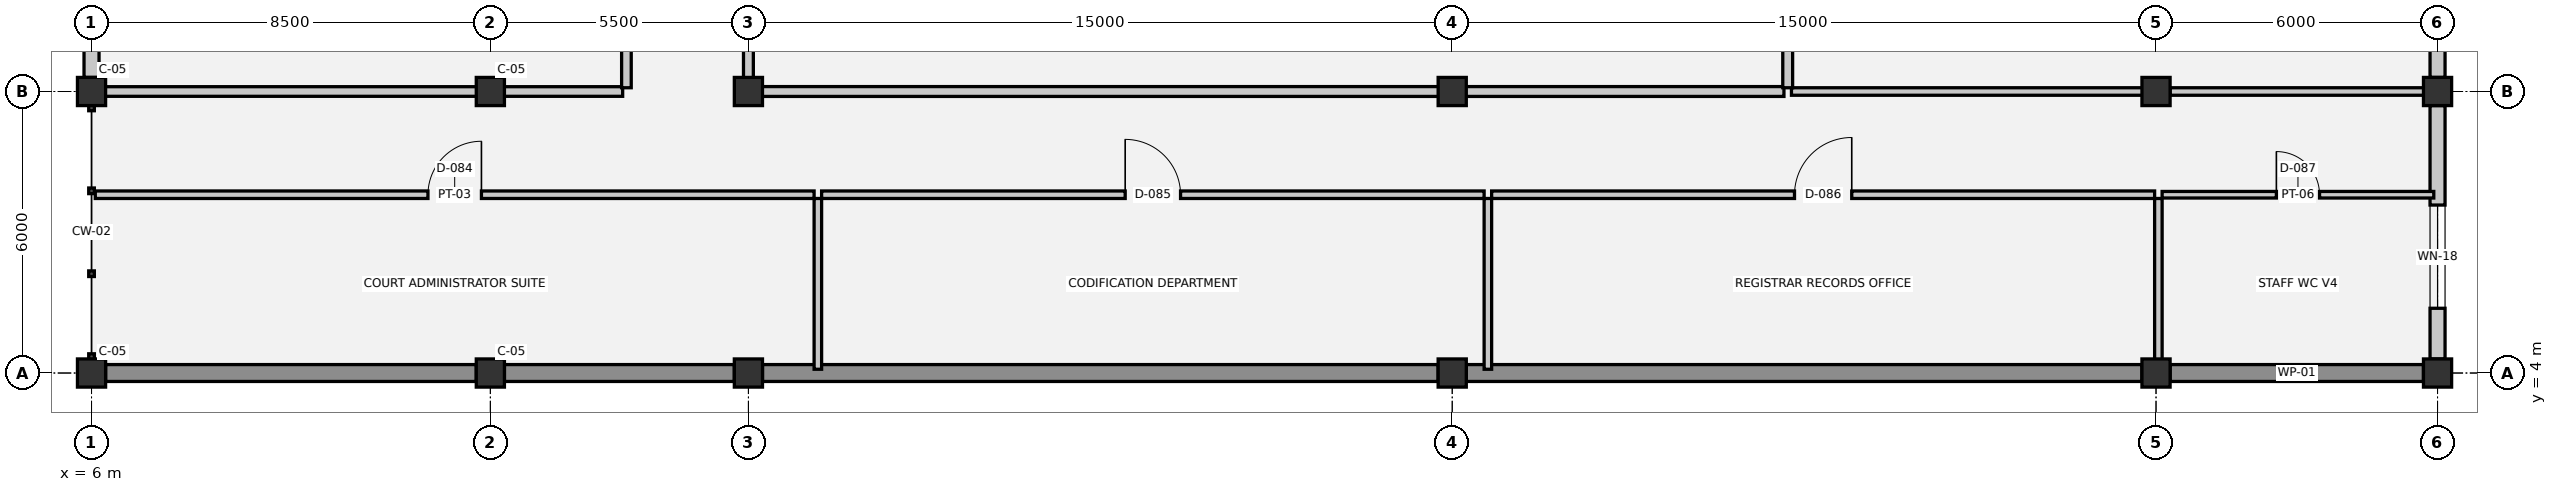
"""IFC4 building model, lengths in metres.
Left out: names, types, materials, properties, quantities, classifications, styles, units other than length and angle.
Written with IfcOpenShell. Run it as: python <this file> out.ifc"""

import sys

from ifc_helpers import new_model, si_unit, direction, frame, frame_2d, origin, origin_2d, place, context, subcontext, project, spatial, rectangle, extrude, element, fill, save


model = new_model("IFC4")
c1 = context("Model", 3, precision=1e-05, world=origin(), true_north=direction((0.0, 1.0)))
c2 = subcontext(c1, "Body", "Model", "MODEL_VIEW")
j1 = project(units=[si_unit("LENGTHUNIT", "METRE"), si_unit("PLANEANGLEUNIT", "RADIAN")], contexts=[c1])
p1 = place(None, origin())
s1 = spatial("IfcSite", under=j1, at=p1, CompositionType="ELEMENT")
p2 = place(p1, origin())
s2 = spatial("IfcBuilding", under=s1, at=p2, CompositionType="ELEMENT")
p3 = place(p2, frame((0.0, 0.0, 14.4)))
s3 = spatial("IfcBuildingStorey", under=s2, at=p3, CompositionType="ELEMENT", Elevation=14.4)
for number, where, z_axis, x_axis in (
    (1, (6.0, 4.0, 0.0), (0.0, 0.0, 1.0), (1.0, 0.0, 0.0)),
    (2, (6.0, 10.0, 0.0), (0.0, 0.0, 1.0), (1.0, 0.0, 0.0)),
    (3, (14.5, 4.0, 0.0), (0.0, 0.0, 1.0), (1.0, 0.0, 0.0)),
    (4, (14.5, 10.0, 0.0), (0.0, 0.0, 1.0), (1.0, 0.0, 0.0)),
    (5, (20.0, 4.0, 0.0), (0.0, 0.0, 1.0), (1.0, 0.0, 0.0)),
    (6, (20.0, 10.0, 0.0), (0.0, 0.0, 1.0), (1.0, 0.0, 0.0)),
    (7, (35.0, 4.0, 0.0), (0.0, 0.0, 1.0), (1.0, 0.0, 0.0)),
    (8, (35.0, 10.0, 0.0), (0.0, 0.0, 1.0), (1.0, 0.0, 0.0)),
    (9, (50.0, 4.0, 0.0), (0.0, 0.0, 1.0), (1.0, 0.0, 0.0)),
    (10, (50.0, 10.0, 0.0), (0.0, 0.0, 1.0), (1.0, 0.0, 0.0)),
    (11, (56.0, 4.0, 0.0), (0.0, 0.0, 1.0), (1.0, 0.0, 0.0)),
    (12, (56.0, 10.0, 0.0), (0.0, 0.0, 1.0), (1.0, 0.0, 0.0)),
):
    element("IfcColumn", number, at=place(p3, frame(where, z_axis=z_axis, x_axis=x_axis)), inside=s3, PredefinedType="COLUMN", context=c2, shape_type="SweptSolid", body=[
        extrude(rectangle(XDim=0.6, YDim=0.6, at=origin_2d()), origin(), (0.0, 0.0, 1.0), 3.9),
    ])
p4 = place(p3, frame((6.0, 10.3, 0.0), z_axis=(0.0, 0.0, 1.0), x_axis=(0.0, 1.0, 0.0)))
e13 = element("IfcWall", 13, at=p4, inside=s3, PredefinedType="SOLIDWALL", context=c2, shape_type="SweptSolid", body=[
    extrude(rectangle(XDim=6.4, YDim=0.32, at=frame_2d((3.2, 0.0))), origin(), (0.0, 0.0, 1.0), 2.61),
])
p5 = place(p4, frame((2.1, 0.0, 0.9)))
e14 = element("IfcOpeningElement", 14, at=p5, cuts=e13, PredefinedType="OPENING", context=c2, shape_type="SweptSolid", body=[
    extrude(rectangle(XDim=2.2, YDim=1.0, at=frame_2d((1.1, 0.5))), frame((0.0, 0.17, 0.0), z_axis=(0.0, -1.0, 0.0), x_axis=(1.0, 0.0, 0.0)), (0.0, 0.0, 1.0), 0.34),
])
p6 = place(p3, frame((56.0, 16.7, 0.0), z_axis=(0.0, 0.0, 1.0), x_axis=(0.0, -1.0, 0.0)))
e15 = element("IfcWall", 15, at=p6, inside=s3, PredefinedType="SOLIDWALL", context=c2, shape_type="SweptSolid", body=[
    extrude(rectangle(XDim=6.4, YDim=0.32, at=frame_2d((3.2, 0.0))), origin(), (0.0, 0.0, 1.0), 2.61),
])
p7 = place(p6, frame((2.1, 0.0, 0.9)))
e16 = element("IfcOpeningElement", 16, at=p7, cuts=e15, PredefinedType="OPENING", context=c2, shape_type="SweptSolid", body=[
    extrude(rectangle(XDim=2.2, YDim=1.0, at=frame_2d((1.1, 0.5))), frame((0.0, 0.17, 0.0), z_axis=(0.0, -1.0, 0.0), x_axis=(1.0, 0.0, 0.0)), (0.0, 0.0, 1.0), 0.34),
])
p8 = place(p3, frame((56.0, 9.7, 0.0), z_axis=(0.0, 0.0, 1.0), x_axis=(0.0, -1.0, 0.0)))
e17 = element("IfcWall", 17, at=p8, inside=s3, PredefinedType="SOLIDWALL", context=c2, shape_type="SweptSolid", body=[
    extrude(rectangle(XDim=5.4, YDim=0.32, at=frame_2d((2.7, 0.0))), origin(), (0.0, 0.0, 1.0), 2.61),
])
p9 = place(p8, frame((2.12, 0.0, 0.9)))
e18 = element("IfcOpeningElement", 18, at=p9, cuts=e17, PredefinedType="OPENING", context=c2, shape_type="SweptSolid", body=[
    extrude(rectangle(XDim=2.2, YDim=1.0, at=frame_2d((1.1, 0.5))), frame((0.0, 0.17, 0.0), z_axis=(0.0, -1.0, 0.0), x_axis=(1.0, 0.0, 0.0)), (0.0, 0.0, 1.0), 0.34),
])
p10 = place(p3, frame((55.7, 4.0, 0.0), z_axis=(0.0, 0.0, 1.0), x_axis=(-1.0, 0.0, 0.0)))
e19 = element("IfcWall", 19, at=p10, inside=s3, PredefinedType="SOLIDWALL", context=c2, shape_type="SweptSolid", body=[
    extrude(rectangle(XDim=5.4, YDim=0.36, at=frame_2d((2.7, 0.0))), origin(), (0.0, 0.0, 1.0), 3.64),
])
for number, where, z_axis, x_axis in (
    (20, (49.7, 4.0, 0.0), (0.0, 0.0, 1.0), (-1.0, 0.0, 0.0)),
    (21, (34.7, 4.0, 0.0), (0.0, 0.0, 1.0), (-1.0, 0.0, 0.0)),
):
    element("IfcWall", number, at=place(p3, frame(where, z_axis=z_axis, x_axis=x_axis)), inside=s3, PredefinedType="SOLIDWALL", context=c2, shape_type="SweptSolid", body=[
        extrude(rectangle(XDim=14.4, YDim=0.36, at=frame_2d((7.2, 0.0))), origin(), (0.0, 0.0, 1.0), 3.64),
    ])
p11 = place(p3, frame((19.7, 4.0, 0.0), z_axis=(0.0, 0.0, 1.0), x_axis=(-1.0, 0.0, 0.0)))
e22 = element("IfcWall", 22, at=p11, inside=s3, PredefinedType="SOLIDWALL", context=c2, shape_type="SweptSolid", body=[
    extrude(rectangle(XDim=4.9, YDim=0.36, at=frame_2d((2.45, 0.0))), origin(), (0.0, 0.0, 1.0), 3.64),
])
p12 = place(p3, frame((14.2, 4.0, 0.0), z_axis=(0.0, 0.0, 1.0), x_axis=(-1.0, 0.0, 0.0)))
e23 = element("IfcWall", 23, at=p12, inside=s3, PredefinedType="SOLIDWALL", context=c2, shape_type="SweptSolid", body=[
    extrude(rectangle(XDim=7.9, YDim=0.36, at=frame_2d((3.95, 0.0))), origin(), (0.0, 0.0, 1.0), 3.64),
])
p13 = place(p3, frame((6.08, 7.8, 0.0), z_axis=(0.0, 0.0, 1.0), x_axis=(1.0, 0.0, 0.0)))
e24 = element("IfcWall", 24, at=p13, inside=s3, PredefinedType="PARTITIONING", context=c2, shape_type="SweptSolid", body=[
    extrude(rectangle(XDim=15.32, YDim=0.16, at=frame_2d((7.66, 0.0))), origin(), (0.0, 0.0, 1.0), 3.54),
])
p14 = place(p13, frame((7.09, 0.0, 0.0)))
e25 = element("IfcOpeningElement", 25, at=p14, cuts=e24, PredefinedType="OPENING", context=c2, shape_type="SweptSolid", body=[
    extrude(rectangle(XDim=1.14, YDim=2.2, at=frame_2d((0.57, 1.1))), frame((0.0, 0.09, 0.0), z_axis=(0.0, -1.0, 0.0), x_axis=(1.0, 0.0, 0.0)), (0.0, 0.0, 1.0), 0.18),
])
p15 = place(p3, frame((21.56, 7.8, 0.0), z_axis=(0.0, 0.0, 1.0), x_axis=(1.0, 0.0, 0.0)))
e26 = element("IfcWall", 26, at=p15, inside=s3, PredefinedType="PARTITIONING", context=c2, shape_type="SweptSolid", body=[
    extrude(rectangle(XDim=14.12, YDim=0.16, at=frame_2d((7.06, 0.0))), origin(), (0.0, 0.0, 1.0), 3.54),
])
p16 = place(p15, frame((6.47, 0.0, 0.0)))
e27 = element("IfcOpeningElement", 27, at=p16, cuts=e26, PredefinedType="OPENING", context=c2, shape_type="SweptSolid", body=[
    extrude(rectangle(XDim=1.18, YDim=2.2, at=frame_2d((0.59, 1.1))), frame((0.0, 0.09, 0.0), z_axis=(0.0, -1.0, 0.0), x_axis=(1.0, 0.0, 0.0)), (0.0, 0.0, 1.0), 0.18),
])
p17 = place(p3, frame((35.84, 7.8, 0.0), z_axis=(0.0, 0.0, 1.0), x_axis=(1.0, 0.0, 0.0)))
e28 = element("IfcWall", 28, at=p17, inside=s3, PredefinedType="PARTITIONING", context=c2, shape_type="SweptSolid", body=[
    extrude(rectangle(XDim=14.13, YDim=0.16, at=frame_2d((7.065, 0.0))), origin(), (0.0, 0.0, 1.0), 3.54),
])
p18 = place(p17, frame((6.455, 0.0, 0.0)))
e29 = element("IfcOpeningElement", 29, at=p18, cuts=e28, PredefinedType="OPENING", context=c2, shape_type="SweptSolid", body=[
    extrude(rectangle(XDim=1.22, YDim=2.2, at=frame_2d((0.61, 1.1))), frame((0.0, 0.09, 0.0), z_axis=(0.0, -1.0, 0.0), x_axis=(1.0, 0.0, 0.0)), (0.0, 0.0, 1.0), 0.18),
])
p19 = place(p3, frame((50.13, 7.8, 0.0), z_axis=(0.0, 0.0, 1.0), x_axis=(1.0, 0.0, 0.0)))
e30 = element("IfcWall", 30, at=p19, inside=s3, PredefinedType="PLUMBINGWALL", context=c2, shape_type="SweptSolid", body=[
    extrude(rectangle(XDim=5.79, YDim=0.14, at=frame_2d((2.895, 0.0))), origin(), (0.0, 0.0, 1.0), 3.54),
])
p20 = place(p19, frame((2.435, 0.0, 0.0)))
e31 = element("IfcOpeningElement", 31, at=p20, cuts=e30, PredefinedType="OPENING", context=c2, shape_type="SweptSolid", body=[
    extrude(rectangle(XDim=0.92, YDim=2.1, at=frame_2d((0.46, 1.05))), frame((0.0, 0.08, 0.0), z_axis=(0.0, -1.0, 0.0), x_axis=(1.0, 0.0, 0.0)), (0.0, 0.0, 1.0), 0.16),
])
p21 = place(p3, frame((6.08, 10.0, 0.0), z_axis=(0.0, 0.0, 1.0), x_axis=(1.0, 0.0, 0.0)))
e32 = element("IfcWall", 32, at=p21, inside=s3, PredefinedType="PARTITIONING", context=c2, shape_type="SweptSolid", body=[
    extrude(rectangle(XDim=11.24, YDim=0.205, at=frame_2d((5.62, 0.0))), origin(), (0.0, 0.0, 1.0), 2.88),
])
p22 = place(p3, frame((20.08, 10.0, 0.0), z_axis=(0.0, 0.0, 1.0), x_axis=(1.0, 0.0, 0.0)))
e33 = element("IfcWall", 33, at=p22, inside=s3, PredefinedType="PARTITIONING", context=c2, shape_type="SweptSolid", body=[
    extrude(rectangle(XDim=21.99, YDim=0.21, at=frame_2d((10.995, 0.0))), origin(), (0.0, 0.0, 1.0), 2.63),
])
p23 = place(p3, frame((42.23, 10.0, 0.0), z_axis=(0.0, 0.0, 1.0), x_axis=(1.0, 0.0, 0.0)))
e34 = element("IfcWall", 34, at=p23, inside=s3, PredefinedType="PARTITIONING", context=c2, shape_type="SweptSolid", body=[
    extrude(rectangle(XDim=8.07, YDim=0.16, at=frame_2d((4.035, 0.0))), origin(), (0.0, 0.0, 1.0), 2.63),
])
p24 = place(p3, frame((50.3, 10.0, 0.0), z_axis=(0.0, 0.0, 1.0), x_axis=(1.0, 0.0, 0.0)))
e35 = element("IfcWall", 35, at=p24, inside=s3, PredefinedType="PARTITIONING", context=c2, shape_type="SweptSolid", body=[
    extrude(rectangle(XDim=5.62, YDim=0.16, at=frame_2d((2.81, 0.0))), origin(), (0.0, 0.0, 1.0), 2.88),
])
p25 = place(p3, frame((17.4, 10.08, 0.0), z_axis=(0.0, 0.0, 1.0), x_axis=(0.0, 1.0, 0.0)))
e36 = element("IfcWall", 36, at=p25, inside=s3, PredefinedType="PARTITIONING", context=c2, shape_type="SweptSolid", body=[
    extrude(rectangle(XDim=14.72, YDim=0.205, at=frame_2d((7.36, 0.0))), origin(), (0.0, 0.0, 1.0), 3.54),
])
p26 = place(p25, frame((6.46, 0.0, 0.0)))
e37 = element("IfcOpeningElement", 37, at=p26, cuts=e36, PredefinedType="OPENING", context=c2, shape_type="SweptSolid", body=[
    extrude(rectangle(XDim=1.8, YDim=2.3, at=frame_2d((0.9, 1.15))), frame((0.0, 0.113, 0.0), z_axis=(0.0, -1.0, 0.0), x_axis=(1.0, 0.0, 0.0)), (0.0, 0.0, 1.0), 0.225),
])
p27 = place(p3, frame((20.0, 10.08, 0.0), z_axis=(0.0, 0.0, 1.0), x_axis=(0.0, 1.0, 0.0)))
e38 = element("IfcWall", 38, at=p27, inside=s3, PredefinedType="PARTITIONING", context=c2, shape_type="SweptSolid", body=[
    extrude(rectangle(XDim=6.62, YDim=0.21, at=frame_2d((3.31, 0.0))), origin(), (0.0, 0.0, 1.0), 3.03),
])
for number, where, z_axis, x_axis in (
    (39, (21.48, 4.08, 0.0), (0.0, 0.0, 1.0), (0.0, 1.0, 0.0)),
    (40, (35.76, 4.08, 0.0), (0.0, 0.0, 1.0), (0.0, 1.0, 0.0)),
):
    element("IfcWall", number, at=place(p3, frame(where, z_axis=z_axis, x_axis=x_axis)), inside=s3, PredefinedType="PARTITIONING", context=c2, shape_type="SweptSolid", body=[
        extrude(rectangle(XDim=3.64, YDim=0.16, at=frame_2d((1.82, 0.0))), origin(), (0.0, 0.0, 1.0), 3.54),
    ])
p28 = place(p3, frame((42.15, 10.08, 0.0), z_axis=(0.0, 0.0, 1.0), x_axis=(0.0, 1.0, 0.0)))
e41 = element("IfcWall", 41, at=p28, inside=s3, PredefinedType="PARTITIONING", context=c2, shape_type="SweptSolid", body=[
    extrude(rectangle(XDim=14.84, YDim=0.21, at=frame_2d((7.42, 0.0))), origin(), (0.0, 0.0, 1.0), 3.54),
])
p29 = place(p3, frame((50.05, 4.08, 0.0), z_axis=(0.0, 0.0, 1.0), x_axis=(0.0, 1.0, 0.0)))
e42 = element("IfcWall", 42, at=p29, inside=s3, PredefinedType="PARTITIONING", context=c2, shape_type="SweptSolid", body=[
    extrude(rectangle(XDim=3.64, YDim=0.16, at=frame_2d((1.82, 0.0))), origin(), (0.0, 0.0, 1.0), 3.03),
])
p30 = place(p9, origin())
e43 = element("IfcWindow", 43, at=p30, inside=s3, PartitioningType="SINGLE_PANEL", PredefinedType="WINDOW", context=c2, shape_type="SweptSolid", body=[
    extrude(rectangle(XDim=2.2, YDim=1.0, at=frame_2d((1.1, 0.5))), frame((0.0, 0.03, 0.0), z_axis=(0.0, -1.0, 0.0), x_axis=(1.0, 0.0, 0.0)), (0.0, 0.0, 1.0), 0.06),
])
fill(e18, e43)
p31 = place(p14, origin())
e44 = element("IfcDoor", 44, at=p31, inside=s3, OperationType="SINGLE_SWING_RIGHT", PredefinedType="DOOR", context=c2, shape_type="SweptSolid", body=[
    extrude(rectangle(XDim=1.14, YDim=2.2, at=frame_2d((0.57, 1.1))), frame((0.0, 0.025, 0.0), z_axis=(0.0, -1.0, 0.0), x_axis=(1.0, 0.0, 0.0)), (0.0, 0.0, 1.0), 0.05),
])
fill(e25, e44)
p32 = place(p16, origin())
e45 = element("IfcDoor", 45, at=p32, inside=s3, OperationType="SINGLE_SWING_LEFT", PredefinedType="DOOR", context=c2, shape_type="SweptSolid", body=[
    extrude(rectangle(XDim=1.18, YDim=2.2, at=frame_2d((0.59, 1.1))), frame((0.0, 0.025, 0.0), z_axis=(0.0, -1.0, 0.0), x_axis=(1.0, 0.0, 0.0)), (0.0, 0.0, 1.0), 0.05),
])
fill(e27, e45)
p33 = place(p18, origin())
e46 = element("IfcDoor", 46, at=p33, inside=s3, OperationType="SINGLE_SWING_RIGHT", PredefinedType="DOOR", context=c2, shape_type="SweptSolid", body=[
    extrude(rectangle(XDim=1.22, YDim=2.2, at=frame_2d((0.61, 1.1))), frame((0.0, 0.025, 0.0), z_axis=(0.0, -1.0, 0.0), x_axis=(1.0, 0.0, 0.0)), (0.0, 0.0, 1.0), 0.05),
])
fill(e29, e46)
p34 = place(p20, origin())
e47 = element("IfcDoor", 47, at=p34, inside=s3, OperationType="SINGLE_SWING_LEFT", PredefinedType="DOOR", context=c2, shape_type="SweptSolid", body=[
    extrude(rectangle(XDim=0.92, YDim=2.1, at=frame_2d((0.46, 1.05))), frame((0.0, 0.025, 0.0), z_axis=(0.0, -1.0, 0.0), x_axis=(1.0, 0.0, 0.0)), (0.0, 0.0, 1.0), 0.05),
])
fill(e31, e47)
save(model, sys.argv[1])
